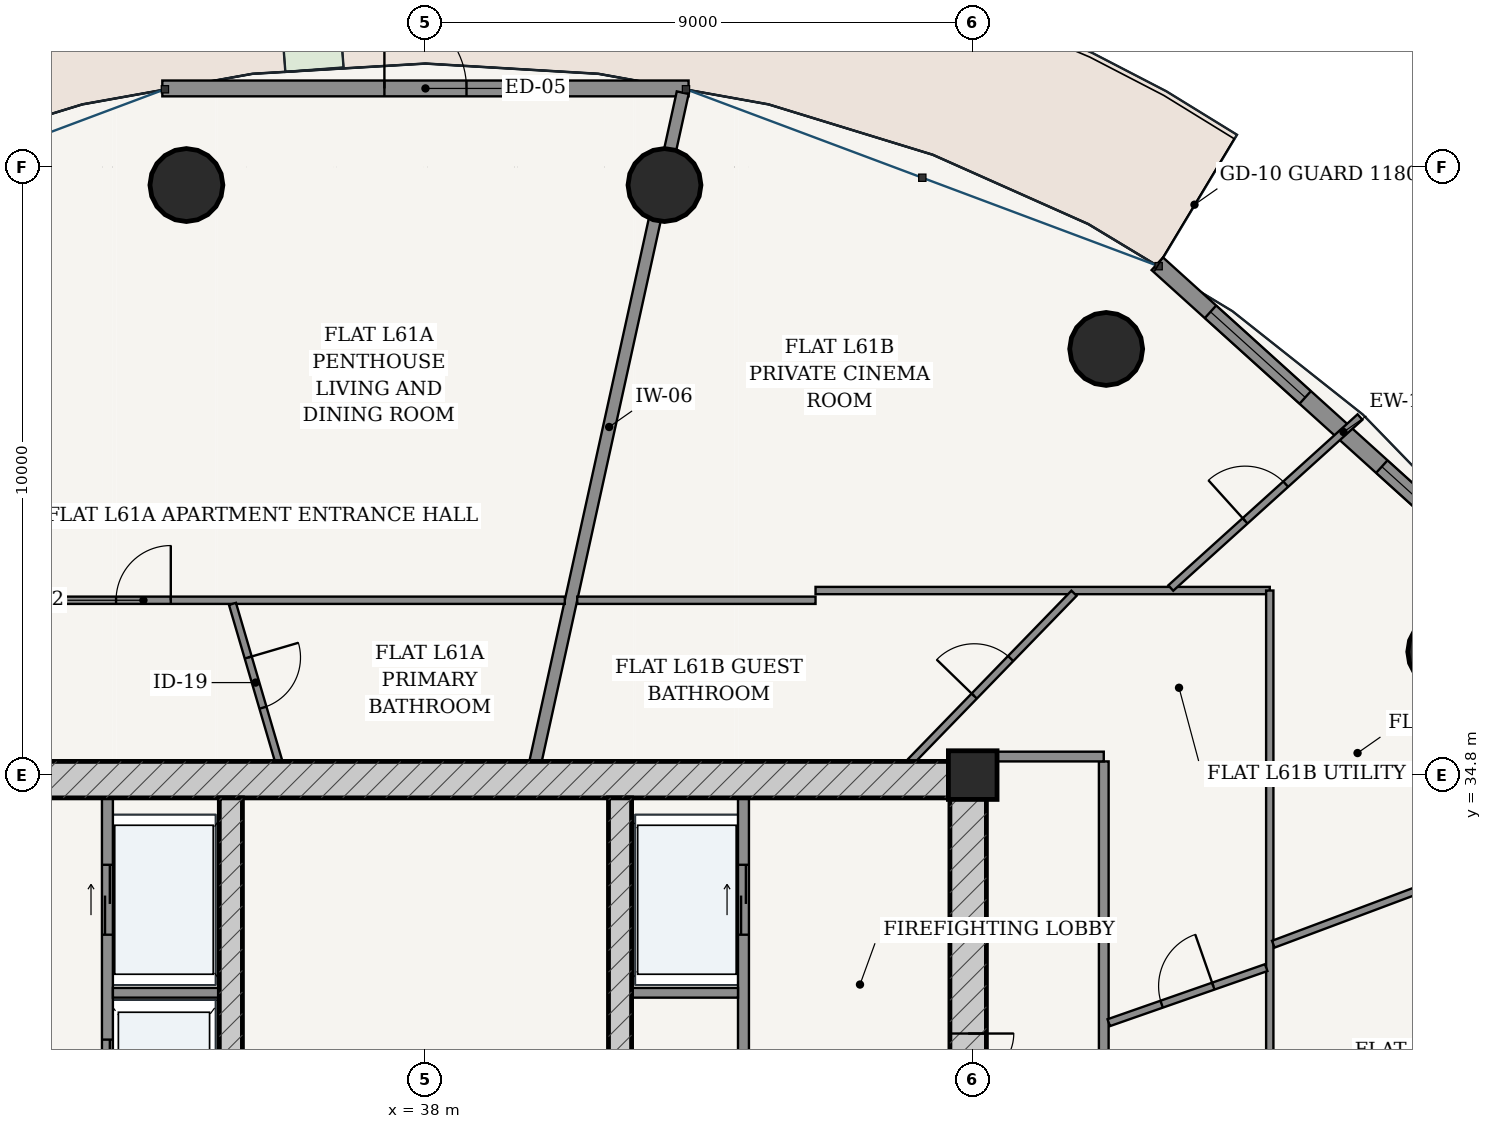
"""IFC4 building model, lengths in metres.
Left out: names, types, materials, properties, quantities, classifications, styles, units other than length and angle.
Written with IfcOpenShell. Run it as: python <this file> out.ifc"""

import sys

from ifc_helpers import new_model, si_unit, direction, frame, frame_2d, origin, origin_2d, place, context, subcontext, project, spatial, rectangle, hollow_circle, extrude, source, transform, mapped, element, fill, save


model = new_model("IFC4")
c1 = context("Model", 3, precision=1e-05, world=origin(), true_north=direction((-0.2419218956, 0.970295726276)))
c2 = subcontext(c1, "Body", "Model", "MODEL_VIEW")
j1 = project(units=[si_unit("LENGTHUNIT", "METRE"), si_unit("PLANEANGLEUNIT", "RADIAN")], contexts=[c1])
p1 = place(None, origin())
s1 = spatial("IfcSite", under=j1, at=p1, CompositionType="ELEMENT")
p2 = place(p1, origin())
s2 = spatial("IfcBuilding", under=s1, at=p2, CompositionType="ELEMENT")
p3 = place(p2, frame((0.0, 0.0, 231.9)))
s3 = spatial("IfcBuildingStorey", under=s2, at=p3, CompositionType="ELEMENT", Elevation=231.9)
p4 = place(p3, frame((47.0, 34.8, 0.0), z_axis=(0.0, 0.0, 1.0), x_axis=(1.0, 0.0, 0.0)))
e1 = element("IfcColumn", 1, at=p4, inside=s3, PredefinedType="COLUMN", context=c2, shape_type="SweptSolid", body=[
    extrude(rectangle(XDim=0.8, YDim=0.8, at=origin_2d()), origin(), (0.0, 0.0, 1.0), 3.7),
])
p5 = place(p3, frame((28.775, 34.725, 0.0), z_axis=(0.0, 0.0, 1.0), x_axis=(1.0, 0.0, 0.0)))
e2 = element("IfcWall", 2, at=p5, inside=s3, PredefinedType="SHEAR", context=c2, shape_type="SweptSolid", body=[
    extrude(rectangle(XDim=18.45, YDim=0.6, at=frame_2d((9.225, 0.0))), origin(), (0.0, 0.0, 1.0), 3.435),
])
p6 = place(p3, frame((46.925, 19.175, 0.0), z_axis=(0.0, 0.0, 1.0), x_axis=(0.0, 1.0, 0.0)))
e3 = element("IfcWall", 3, at=p6, inside=s3, PredefinedType="SHEAR", context=c2, shape_type="SweptSolid", body=[
    extrude(rectangle(XDim=15.25, YDim=0.6, at=frame_2d((7.625, 0.0))), origin(), (0.0, 0.0, 1.0), 3.435),
])
p7 = place(p6, frame((9.875, 0.0, 0.0)))
e4 = element("IfcOpeningElement", 4, at=p7, cuts=e3, PredefinedType="OPENING", context=c2, shape_type="SweptSolid", body=[
    extrude(rectangle(XDim=1.5, YDim=2.2, at=frame_2d((0.75, 1.1))), frame((0.0, 0.31, 0.0), z_axis=(0.0, -1.0, 0.0), x_axis=(1.0, 0.0, 0.0)), (0.0, 0.0, 1.0), 0.62),
])
p8 = place(p3, frame((34.8, 19.175, 0.0), z_axis=(0.0, 0.0, 1.0), x_axis=(0.0, 1.0, 0.0)))
e5 = element("IfcWall", 5, at=p8, inside=s3, PredefinedType="SHEAR", context=c2, shape_type="SweptSolid", body=[
    extrude(rectangle(XDim=15.25, YDim=0.38, at=frame_2d((7.625, 0.0))), origin(), (0.0, 0.0, 1.0), 3.435),
])
p9 = place(p8, frame((7.8, 0.0, 0.0)))
e6 = element("IfcOpeningElement", 6, at=p9, cuts=e5, PredefinedType="OPENING", context=c2, shape_type="SweptSolid", body=[
    extrude(rectangle(XDim=1.05, YDim=2.15, at=frame_2d((0.525, 1.075))), frame((0.0, 0.2, 0.0), z_axis=(0.0, -1.0, 0.0), x_axis=(1.0, 0.0, 0.0)), (0.0, 0.0, 1.0), 0.4),
])
p10 = place(p3, frame((41.2, 19.175, 0.0), z_axis=(0.0, 0.0, 1.0), x_axis=(0.0, 1.0, 0.0)))
e7 = element("IfcWall", 7, at=p10, inside=s3, PredefinedType="SHEAR", context=c2, shape_type="SweptSolid", body=[
    extrude(rectangle(XDim=15.25, YDim=0.38, at=frame_2d((7.625, 0.0))), origin(), (0.0, 0.0, 1.0), 3.435),
])
p11 = place(p10, frame((7.8, 0.0, 0.0)))
e8 = element("IfcOpeningElement", 8, at=p11, cuts=e7, PredefinedType="OPENING", context=c2, shape_type="SweptSolid", body=[
    extrude(rectangle(XDim=1.05, YDim=2.15, at=frame_2d((0.525, 1.075))), frame((0.0, 0.2, 0.0), z_axis=(0.0, -1.0, 0.0), x_axis=(1.0, 0.0, 0.0)), (0.0, 0.0, 1.0), 0.4),
])
for number, where, z_axis, x_axis in (
    (9, (54.754, 36.828, 0.0), (0.0, 0.0, 1.0), (1.0, 0.0, 0.0)),
    (10, (49.195, 41.808, 0.0), (0.0, 0.0, 1.0), (1.0, 0.0, 0.0)),
    (11, (41.931, 44.503, 0.0), (0.0, 0.0, 1.0), (1.0, 0.0, 0.0)),
    (12, (34.069, 44.503, 0.0), (0.0, 0.0, 1.0), (1.0, 0.0, 0.0)),
):
    element("IfcColumn", number, at=place(p3, frame(where, z_axis=z_axis, x_axis=x_axis)), inside=s3, PredefinedType="COLUMN", context=c2, shape_type="SweptSolid", body=[
        extrude(hollow_circle(Radius=0.6, WallThickness=0.038, at=origin_2d()), origin(), (0.0, 0.0, 1.0), 3.7),
    ])
p12 = place(p3, frame((56.16, 37.674, 0.0), z_axis=(0.0, 0.0, 1.0), x_axis=(-0.741972126783, 0.670430729514, 0.0)))
e13 = element("IfcWall", 13, at=p12, inside=s3, PredefinedType="SOLIDWALL", context=c2, shape_type="SweptSolid", body=[
    extrude(rectangle(XDim=8.255, YDim=0.28, at=frame_2d((4.127, 0.0))), origin(), (0.0, 0.0, 1.0), 3.435),
])
p13 = place(p12, frame((1.179, 0.0, 0.85)))
e14 = element("IfcOpeningElement", 14, at=p13, cuts=e13, PredefinedType="OPENING", context=c2, shape_type="SweptSolid", body=[
    extrude(rectangle(XDim=2.1, YDim=1.95, at=frame_2d((1.05, 0.975))), frame((0.0, 0.15, 0.0), z_axis=(0.0, -1.0, 0.0), x_axis=(1.0, 0.0, 0.0)), (0.0, 0.0, 1.0), 0.3),
])
p14 = place(p12, frame((4.976, 0.0, 0.85)))
e15 = element("IfcOpeningElement", 15, at=p14, cuts=e13, PredefinedType="OPENING", context=c2, shape_type="SweptSolid", body=[
    extrude(rectangle(XDim=2.1, YDim=1.95, at=frame_2d((1.05, 0.975))), frame((0.0, 0.15, 0.0), z_axis=(0.0, -1.0, 0.0), x_axis=(1.0, 0.0, 0.0)), (0.0, 0.0, 1.0), 0.3),
])
p15 = place(p3, frame((42.327, 46.092, 0.0), z_axis=(0.0, 0.0, 1.0), x_axis=(-1.0, 0.0, 0.0)))
e16 = element("IfcWall", 16, at=p15, inside=s3, PredefinedType="SOLIDWALL", context=c2, shape_type="SweptSolid", body=[
    extrude(rectangle(XDim=8.654, YDim=0.26, at=frame_2d((4.327, 0.0))), origin(), (0.0, 0.0, 1.0), 3.435),
])
p16 = place(p15, frame((3.652, 0.0, 0.0)))
e17 = element("IfcOpeningElement", 17, at=p16, cuts=e16, PredefinedType="OPENING", context=c2, shape_type="SweptSolid", body=[
    extrude(rectangle(XDim=1.35, YDim=2.2, at=frame_2d((0.675, 1.1))), frame((0.0, 0.14, 0.0), z_axis=(0.0, -1.0, 0.0), x_axis=(1.0, 0.0, 0.0)), (0.0, 0.0, 1.0), 0.28),
])
p17 = place(p3, frame((32.77, 28.52, 0.0), z_axis=(0.0, 0.0, 1.0), x_axis=(0.0, 1.0, 0.0)))
e18 = element("IfcWall", 18, at=p17, inside=s3, PredefinedType="PARTITIONING", context=c2, shape_type="SweptSolid", body=[
    extrude(rectangle(XDim=5.905, YDim=0.18, at=frame_2d((2.953, 0.0))), origin(), (0.0, 0.0, 1.0), 3.435),
])
p18 = place(p17, frame((3.655, 0.0, 0.0)))
e19 = element("IfcOpeningElement", 19, at=p18, cuts=e18, PredefinedType="OPENING", context=c2, shape_type="SweptSolid", body=[
    extrude(rectangle(XDim=1.15, YDim=2.2, at=frame_2d((0.575, 1.1))), frame((0.0, 0.1, 0.0), z_axis=(0.0, -1.0, 0.0), x_axis=(1.0, 0.0, 0.0)), (0.0, 0.0, 1.0), 0.2),
])
p19 = place(p17, frame((0.73, 0.0, 0.0)))
e20 = element("IfcOpeningElement", 20, at=p19, cuts=e18, PredefinedType="OPENING", context=c2, shape_type="SweptSolid", body=[
    extrude(rectangle(XDim=1.2, YDim=2.25, at=frame_2d((0.6, 1.125))), frame((0.0, 0.1, 0.0), z_axis=(0.0, -1.0, 0.0), x_axis=(1.0, 0.0, 0.0)), (0.0, 0.0, 1.0), 0.2),
])
p20 = place(p3, frame((32.86, 31.22, 0.0), z_axis=(0.0, 0.0, 1.0), x_axis=(1.0, 0.0, 0.0)))
e21 = element("IfcWall", 21, at=p20, inside=s3, PredefinedType="PARTITIONING", context=c2, shape_type="SweptSolid", body=[
    extrude(rectangle(XDim=1.75, YDim=0.16, at=frame_2d((0.875, 0.0))), origin(), (0.0, 0.0, 1.0), 3.435),
])
p21 = place(p3, frame((43.23, 28.52, 0.0), z_axis=(0.0, 0.0, 1.0), x_axis=(0.0, 1.0, 0.0)))
e22 = element("IfcWall", 22, at=p21, inside=s3, PredefinedType="PARTITIONING", context=c2, shape_type="SweptSolid", body=[
    extrude(rectangle(XDim=5.905, YDim=0.18, at=frame_2d((2.953, 0.0))), origin(), (0.0, 0.0, 1.0), 3.435),
])
p22 = place(p21, frame((0.905, 0.0, 0.0)))
e23 = element("IfcOpeningElement", 23, at=p22, cuts=e22, PredefinedType="OPENING", context=c2, shape_type="SweptSolid", body=[
    extrude(rectangle(XDim=0.85, YDim=2.1, at=frame_2d((0.425, 1.05))), frame((0.0, 0.1, 0.0), z_axis=(0.0, -1.0, 0.0), x_axis=(1.0, 0.0, 0.0)), (0.0, 0.0, 1.0), 0.2),
])
p23 = place(p21, frame((3.655, 0.0, 0.0)))
e24 = element("IfcOpeningElement", 24, at=p23, cuts=e22, PredefinedType="OPENING", context=c2, shape_type="SweptSolid", body=[
    extrude(rectangle(XDim=1.15, YDim=2.2, at=frame_2d((0.575, 1.1))), frame((0.0, 0.1, 0.0), z_axis=(0.0, -1.0, 0.0), x_axis=(1.0, 0.0, 0.0)), (0.0, 0.0, 1.0), 0.2),
])
p24 = place(p3, frame((41.39, 31.22, 0.0), z_axis=(0.0, 0.0, 1.0), x_axis=(1.0, 0.0, 0.0)))
e25 = element("IfcWall", 25, at=p24, inside=s3, PredefinedType="PARTITIONING", context=c2, shape_type="SweptSolid", body=[
    extrude(rectangle(XDim=1.75, YDim=0.16, at=frame_2d((0.875, 0.0))), origin(), (0.0, 0.0, 1.0), 3.435),
])
p25 = place(p3, frame((49.155, 16.725, 0.0), z_axis=(0.0, 0.0, 1.0), x_axis=(0.0, 1.0, 0.0)))
e26 = element("IfcWall", 26, at=p25, inside=s3, PredefinedType="PARTITIONING", context=c2, shape_type="SweptSolid", body=[
    extrude(rectangle(XDim=18.3, YDim=0.16, at=frame_2d((9.15, 0.0))), origin(), (0.0, 0.0, 1.0), 2.951),
])
p26 = place(p3, frame((47.225, 35.105, 0.0), z_axis=(0.0, 0.0, 1.0), x_axis=(1.0, 0.0, 0.0)))
e27 = element("IfcWall", 27, at=p26, inside=s3, PredefinedType="PARTITIONING", context=c2, shape_type="SweptSolid", body=[
    extrude(rectangle(XDim=1.93, YDim=0.16, at=frame_2d((0.965, 0.0))), origin(), (0.0, 0.0, 1.0), 3.435),
])
p27 = place(p3, frame((39.811, 35.027, 0.0), z_axis=(0.0, 0.0, 1.0), x_axis=(0.214966857327, 0.976621344356, 0.0)))
e28 = element("IfcWall", 28, at=p27, inside=s3, PredefinedType="PARTITIONING", context=c2, shape_type="SweptSolid", body=[
    extrude(rectangle(XDim=11.258, YDim=0.2, at=frame_2d((5.629, 0.0))), origin(), (0.0, 0.0, 1.0), 2.52),
])
p28 = place(p3, frame((31.585, 37.675, 0.0), z_axis=(0.0, 0.0, 1.0), x_axis=(1.0, 0.0, 0.0)))
e29 = element("IfcWall", 29, at=p28, inside=s3, PredefinedType="PARTITIONING", context=c2, shape_type="SweptSolid", body=[
    extrude(rectangle(XDim=8.707, YDim=0.12, at=frame_2d((4.354, 0.0))), origin(), (0.0, 0.0, 1.0), 2.951),
])
p29 = place(p28, frame((1.327, 0.0, 0.0)))
e30 = element("IfcOpeningElement", 30, at=p29, cuts=e29, PredefinedType="OPENING", context=c2, shape_type="SweptSolid", body=[
    extrude(rectangle(XDim=0.9, YDim=2.15, at=frame_2d((0.45, 1.075))), frame((0.0, 0.07, 0.0), z_axis=(0.0, -1.0, 0.0), x_axis=(1.0, 0.0, 0.0)), (0.0, 0.0, 1.0), 0.14),
])
p30 = place(p3, frame((35.586, 35.027, 0.0), z_axis=(0.0, 0.0, 1.0), x_axis=(-0.281539118681, 0.959549751004, 0.0)))
e31 = element("IfcWall", 31, at=p30, inside=s3, PredefinedType="PARTITIONING", context=c2, shape_type="SweptSolid", body=[
    extrude(rectangle(XDim=2.698, YDim=0.12, at=frame_2d((1.349, 0.0))), origin(), (0.0, 0.0, 1.0), 2.52),
])
p31 = place(p30, frame((0.919, 0.0, 0.0)))
e32 = element("IfcOpeningElement", 32, at=p31, cuts=e31, PredefinedType="OPENING", context=c2, shape_type="SweptSolid", body=[
    extrude(rectangle(XDim=0.86, YDim=2.15, at=frame_2d((0.43, 1.075))), frame((0.0, 0.07, 0.0), z_axis=(0.0, -1.0, 0.0), x_axis=(1.0, 0.0, 0.0)), (0.0, 0.0, 1.0), 0.14),
])
p32 = place(p3, frame((40.496, 37.675, 0.0), z_axis=(0.0, 0.0, 1.0), x_axis=(1.0, 0.0, 0.0)))
e33 = element("IfcWall", 33, at=p32, inside=s3, PredefinedType="PARTITIONING", context=c2, shape_type="SweptSolid", body=[
    extrude(rectangle(XDim=3.919, YDim=0.12, at=frame_2d((1.959, 0.0))), origin(), (0.0, 0.0, 1.0), 2.951),
])
p33 = place(p3, frame((44.415, 37.835, 0.0), z_axis=(0.0, 0.0, 1.0), x_axis=(1.0, 0.0, 0.0)))
e34 = element("IfcWall", 34, at=p33, inside=s3, PredefinedType="PARTITIONING", context=c2, shape_type="SweptSolid", body=[
    extrude(rectangle(XDim=7.47, YDim=0.12, at=frame_2d((3.735, 0.0))), origin(), (0.0, 0.0, 1.0), 2.951),
])
p34 = place(p3, frame((51.885, 37.835, 0.0), z_axis=(0.0, 0.0, 1.0), x_axis=(0.0, -1.0, 0.0)))
e35 = element("IfcWall", 35, at=p34, inside=s3, PredefinedType="PARTITIONING", context=c2, shape_type="SweptSolid", body=[
    extrude(rectangle(XDim=23.92, YDim=0.12, at=frame_2d((11.96, 0.0))), origin(), (0.0, 0.0, 1.0), 2.951),
])
p35 = place(p34, frame((16.558, 0.0, 0.0)))
e36 = element("IfcOpeningElement", 36, at=p35, cuts=e35, PredefinedType="OPENING", context=c2, shape_type="SweptSolid", body=[
    extrude(rectangle(XDim=0.9, YDim=2.15, at=frame_2d((0.45, 1.075))), frame((0.0, 0.07, 0.0), z_axis=(0.0, -1.0, 0.0), x_axis=(1.0, 0.0, 0.0)), (0.0, 0.0, 1.0), 0.14),
])
p36 = place(p3, frame((51.943, 32.019, 0.0), z_axis=(0.0, 0.0, 1.0), x_axis=(0.936540194592, 0.350560214389, 0.0)))
e37 = element("IfcWall", 37, at=p36, inside=s3, PredefinedType="PARTITIONING", context=c2, shape_type="SweptSolid", body=[
    extrude(rectangle(XDim=6.556, YDim=0.12, at=frame_2d((3.278, 0.0))), origin(), (0.0, 0.0, 1.0), 2.951),
])
p37 = place(p36, frame((2.828, 0.0, 0.0)))
e38 = element("IfcOpeningElement", 38, at=p37, cuts=e37, PredefinedType="OPENING", context=c2, shape_type="SweptSolid", body=[
    extrude(rectangle(XDim=0.9, YDim=2.15, at=frame_2d((0.45, 1.075))), frame((0.0, 0.07, 0.0), z_axis=(0.0, -1.0, 0.0), x_axis=(1.0, 0.0, 0.0)), (0.0, 0.0, 1.0), 0.14),
])
p38 = place(p3, frame((50.257, 37.876, 0.0), z_axis=(0.0, 0.0, 1.0), x_axis=(0.741943837234, 0.670462036502, 0.0)))
e39 = element("IfcWall", 39, at=p38, inside=s3, PredefinedType="PARTITIONING", context=c2, shape_type="SweptSolid", body=[
    extrude(rectangle(XDim=4.194, YDim=0.12, at=frame_2d((2.097, 0.0))), origin(), (0.0, 0.0, 1.0), 2.951),
])
p39 = place(p38, frame((1.647, 0.0, 0.0)))
e40 = element("IfcOpeningElement", 40, at=p39, cuts=e39, PredefinedType="OPENING", context=c2, shape_type="SweptSolid", body=[
    extrude(rectangle(XDim=0.9, YDim=2.15, at=frame_2d((0.45, 1.075))), frame((0.0, 0.07, 0.0), z_axis=(0.0, -1.0, 0.0), x_axis=(1.0, 0.0, 0.0)), (0.0, 0.0, 1.0), 0.14),
])
p40 = place(p3, frame((49.237, 30.729, 0.0), z_axis=(0.0, 0.0, 1.0), x_axis=(0.94398177501, 0.329997588549, 0.0)))
e41 = element("IfcWall", 41, at=p40, inside=s3, PredefinedType="PARTITIONING", context=c2, shape_type="SweptSolid", body=[
    extrude(rectangle(XDim=2.743, YDim=0.12, at=frame_2d((1.372, 0.0))), origin(), (0.0, 0.0, 1.0), 3.11),
])
p41 = place(p40, frame((0.922, 0.0, 0.0)))
e42 = element("IfcOpeningElement", 42, at=p41, cuts=e41, PredefinedType="OPENING", context=c2, shape_type="SweptSolid", body=[
    extrude(rectangle(XDim=0.9, YDim=2.15, at=frame_2d((0.45, 1.075))), frame((0.0, 0.07, 0.0), z_axis=(0.0, -1.0, 0.0), x_axis=(1.0, 0.0, 0.0)), (0.0, 0.0, 1.0), 0.14),
])
p42 = place(p3, frame((45.983, 35.026, 0.0), z_axis=(0.0, 0.0, 1.0), x_axis=(0.696410097703, 0.717644045344, 0.0)))
e43 = element("IfcWall", 43, at=p42, inside=s3, PredefinedType="PARTITIONING", context=c2, shape_type="SweptSolid", body=[
    extrude(rectangle(XDim=3.852, YDim=0.12, at=frame_2d((1.926, 0.0))), origin(), (0.0, 0.0, 1.0), 2.951),
])
p43 = place(p42, frame((1.496, 0.0, 0.0)))
e44 = element("IfcOpeningElement", 44, at=p43, cuts=e43, PredefinedType="OPENING", context=c2, shape_type="SweptSolid", body=[
    extrude(rectangle(XDim=0.86, YDim=2.15, at=frame_2d((0.43, 1.075))), frame((0.0, 0.07, 0.0), z_axis=(0.0, -1.0, 0.0), x_axis=(1.0, 0.0, 0.0)), (0.0, 0.0, 1.0), 0.14),
])
m1 = source(origin(), c2, "Body", "SweptSolid", [
    extrude(rectangle(XDim=2.1, YDim=1.95, at=frame_2d((1.05, 0.975))), frame((0.0, 0.03, 0.0), z_axis=(0.0, -1.0, 0.0), x_axis=(1.0, 0.0, 0.0)), (0.0, 0.0, 1.0), 0.06),
])
p44 = place(p13, origin())
e45 = element("IfcWindow", 45, at=p44, inside=s3, PartitioningType="SINGLE_PANEL", PredefinedType="WINDOW", context=c2, shape_type="MappedRepresentation", body=[
    mapped(m1, transform((0.0, 0.0, 0.0), scale=1.0)),
])
fill(e14, e45)
p45 = place(p14, origin())
e46 = element("IfcWindow", 46, at=p45, inside=s3, PartitioningType="SINGLE_PANEL", PredefinedType="WINDOW", context=c2, shape_type="MappedRepresentation", body=[
    mapped(m1, transform((0.0, 0.0, 0.0), scale=1.0)),
])
fill(e15, e46)
m2 = source(origin(), c2, "Body", "SweptSolid", [
    extrude(rectangle(XDim=1.35, YDim=2.2, at=frame_2d((0.675, 1.1))), frame((0.0, 0.025, 0.0), z_axis=(0.0, -1.0, 0.0), x_axis=(1.0, 0.0, 0.0)), (0.0, 0.0, 1.0), 0.05),
])
p46 = place(p16, frame((1.35, 0.0, 0.0), z_axis=(0.0, 0.0, 1.0), x_axis=(-1.0, 0.0, 0.0)))
e47 = element("IfcDoor", 47, at=p46, inside=s3, OperationType="SINGLE_SWING_LEFT", PredefinedType="DOOR", context=c2, shape_type="MappedRepresentation", body=[
    mapped(m2, transform((0.0, 0.0, 0.0), scale=1.0)),
])
fill(e17, e47)
m3 = source(origin(), c2, "Body", "SweptSolid", [
    extrude(rectangle(XDim=1.5, YDim=2.2, at=frame_2d((0.75, 1.1))), frame((0.0, 0.025, 0.0), z_axis=(0.0, -1.0, 0.0), x_axis=(1.0, 0.0, 0.0)), (0.0, 0.0, 1.0), 0.05),
])
p47 = place(p7, frame((1.5, 0.0, 0.0), z_axis=(0.0, 0.0, 1.0), x_axis=(-1.0, 0.0, 0.0)))
e48 = element("IfcDoor", 48, at=p47, inside=s3, OperationType="DOUBLE_DOOR_SINGLE_SWING", PredefinedType="DOOR", context=c2, shape_type="MappedRepresentation", body=[
    mapped(m3, transform((0.0, 0.0, 0.0), scale=1.0)),
])
fill(e4, e48)
m4 = source(origin(), c2, "Body", "SweptSolid", [
    extrude(rectangle(XDim=1.15, YDim=2.2, at=frame_2d((0.575, 1.1))), frame((0.0, 0.025, 0.0), z_axis=(0.0, -1.0, 0.0), x_axis=(1.0, 0.0, 0.0)), (0.0, 0.0, 1.0), 0.05),
])
p48 = place(p18, origin())
e49 = element("IfcDoor", 49, at=p48, inside=s3, OperationType="DOUBLE_DOOR_SLIDING", PredefinedType="DOOR", context=c2, shape_type="MappedRepresentation", body=[
    mapped(m4, transform((0.0, 0.0, 0.0), scale=1.0)),
])
fill(e19, e49)
p49 = place(p23, origin())
e50 = element("IfcDoor", 50, at=p49, inside=s3, OperationType="DOUBLE_DOOR_SLIDING", PredefinedType="DOOR", context=c2, shape_type="MappedRepresentation", body=[
    mapped(m4, transform((0.0, 0.0, 0.0), scale=1.0)),
])
fill(e24, e50)
m5 = source(origin(), c2, "Body", "SweptSolid", [
    extrude(rectangle(XDim=1.2, YDim=2.25, at=frame_2d((0.6, 1.125))), frame((0.0, 0.025, 0.0), z_axis=(0.0, -1.0, 0.0), x_axis=(1.0, 0.0, 0.0)), (0.0, 0.0, 1.0), 0.05),
])
p50 = place(p19, origin())
e51 = element("IfcDoor", 51, at=p50, inside=s3, OperationType="DOUBLE_DOOR_SLIDING", PredefinedType="DOOR", context=c2, shape_type="MappedRepresentation", body=[
    mapped(m5, transform((0.0, 0.0, 0.0), scale=1.0)),
])
fill(e20, e51)
m6 = source(origin(), c2, "Body", "SweptSolid", [
    extrude(rectangle(XDim=0.86, YDim=2.15, at=frame_2d((0.43, 1.075))), frame((0.0, 0.025, 0.0), z_axis=(0.0, -1.0, 0.0), x_axis=(1.0, 0.0, 0.0)), (0.0, 0.0, 1.0), 0.05),
])
p51 = place(p31, frame((0.86, 0.0, 0.0), z_axis=(0.0, 0.0, 1.0), x_axis=(-1.0, 0.0, 0.0)))
e52 = element("IfcDoor", 52, at=p51, inside=s3, OperationType="SINGLE_SWING_LEFT", PredefinedType="DOOR", context=c2, shape_type="MappedRepresentation", body=[
    mapped(m6, transform((0.0, 0.0, 0.0), scale=1.0)),
])
fill(e32, e52)
m7 = source(origin(), c2, "Body", "SweptSolid", [
    extrude(rectangle(XDim=0.9, YDim=2.15, at=frame_2d((0.45, 1.075))), frame((0.0, 0.025, 0.0), z_axis=(0.0, -1.0, 0.0), x_axis=(1.0, 0.0, 0.0)), (0.0, 0.0, 1.0), 0.05),
])
p52 = place(p29, origin())
e53 = element("IfcDoor", 53, at=p52, inside=s3, OperationType="SINGLE_SWING_RIGHT", PredefinedType="DOOR", context=c2, shape_type="MappedRepresentation", body=[
    mapped(m7, transform((0.0, 0.0, 0.0), scale=1.0)),
])
fill(e30, e53)
p53 = place(p41, origin())
e54 = element("IfcDoor", 54, at=p53, inside=s3, OperationType="SINGLE_SWING_RIGHT", PredefinedType="DOOR", context=c2, shape_type="MappedRepresentation", body=[
    mapped(m7, transform((0.0, 0.0, 0.0), scale=1.0)),
])
fill(e42, e54)
p54 = place(p43, origin())
e55 = element("IfcDoor", 55, at=p54, inside=s3, OperationType="SINGLE_SWING_LEFT", PredefinedType="DOOR", context=c2, shape_type="MappedRepresentation", body=[
    mapped(m6, transform((0.0, 0.0, 0.0), scale=1.0)),
])
fill(e44, e55)
p55 = place(p39, origin())
e56 = element("IfcDoor", 56, at=p55, inside=s3, OperationType="SINGLE_SWING_LEFT", PredefinedType="DOOR", context=c2, shape_type="MappedRepresentation", body=[
    mapped(m7, transform((0.0, 0.0, 0.0), scale=1.0)),
])
fill(e40, e56)
save(model, sys.argv[1])
